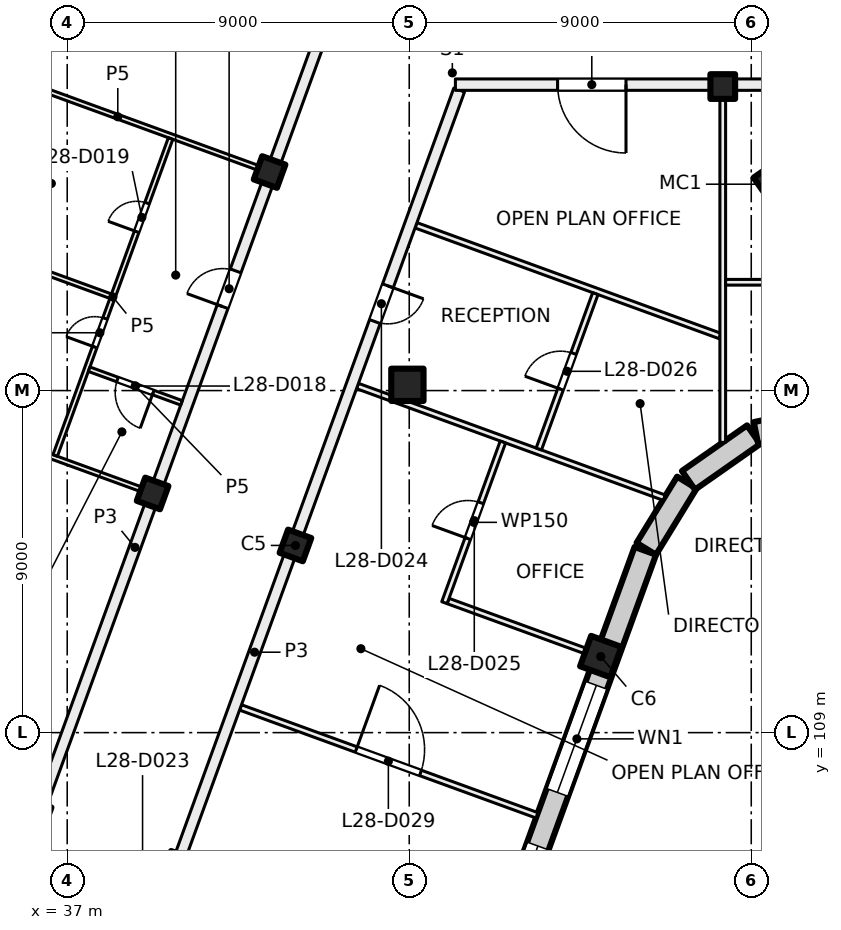
"""IFC4 building model, lengths in metres.
Left out: names, types, materials, properties, quantities, classifications, styles, units other than length and angle.
Written with IfcOpenShell. Run it as: python <this file> out.ifc"""

import sys

from ifc_helpers import new_model, si_unit, direction, frame, frame_2d, origin, origin_2d, place, context, subcontext, project, spatial, rectangle, hollow_rectangle, extrude, element, fill, save


model = new_model("IFC4")
c1 = context("Model", 3, precision=1e-05, world=origin(), true_north=direction((0.0, 1.0)))
c2 = subcontext(c1, "Body", "Model", "MODEL_VIEW")
j1 = project(units=[si_unit("LENGTHUNIT", "METRE"), si_unit("PLANEANGLEUNIT", "RADIAN")], contexts=[c1])
p1 = place(None, origin())
s1 = spatial("IfcSite", under=j1, at=p1, CompositionType="ELEMENT")
p2 = place(p1, origin())
s2 = spatial("IfcBuilding", under=s1, at=p2, CompositionType="ELEMENT")
p3 = place(p2, frame((0.0, 0.0, 121.0)))
s3 = spatial("IfcBuildingStorey", under=s2, at=p3, CompositionType="ELEMENT", Elevation=121.0)
p4 = place(p3, frame((56.036, 123.43, 0.0), z_axis=(0.0, 0.0, 1.0), x_axis=(0.573576436351, -0.819152044289, 0.0)))
e1 = element("IfcColumn", 1, at=p4, inside=s3, PredefinedType="COLUMN", context=c2, shape_type="SweptSolid", body=[
    extrude(hollow_rectangle(XDim=1.4, YDim=1.4, WallThickness=0.04, at=origin_2d()), origin(), (0.0, 0.0, 1.0), 4.0),
])
p5 = place(p3, frame((54.25, 126.0, 0.0), z_axis=(0.0, 0.0, 1.0), x_axis=(1.0, 0.0, 0.0)))
e2 = element("IfcColumn", 2, at=p5, inside=s3, PredefinedType="COLUMN", context=c2, shape_type="SweptSolid", body=[
    extrude(rectangle(XDim=0.65, YDim=0.65, at=origin_2d()), origin(), (0.0, 0.0, 1.0), 4.0),
])
p6 = place(p3, frame((45.952, 118.152, 0.0), z_axis=(0.0, 0.0, 1.0), x_axis=(1.0, 0.0, 0.0)))
e3 = element("IfcColumn", 3, at=p6, inside=s3, PredefinedType="COLUMN", context=c2, shape_type="SweptSolid", body=[
    extrude(rectangle(XDim=0.85, YDim=0.85, at=origin_2d()), origin(), (0.0, 0.0, 1.0), 4.0),
])
for number, where, z_axis, x_axis in (
    (4, (43.006, 113.925, 0.0), (0.0, 0.0, 1.0), (-0.342, -0.94, 0.0)),
    (5, (42.325, 123.751, 0.0), (0.0, 0.0, 1.0), (-0.342, -0.94, 0.0)),
    (6, (39.247, 115.293, 0.0), (0.0, 0.0, 1.0), (-0.342, -0.94, 0.0)),
):
    element("IfcColumn", number, at=place(p3, frame(where, z_axis=z_axis, x_axis=x_axis)), inside=s3, PredefinedType="COLUMN", context=c2, shape_type="SweptSolid", body=[
        extrude(rectangle(XDim=0.65, YDim=0.65, at=origin_2d()), origin(), (0.0, 0.0, 1.0), 4.0),
    ])
p7 = place(p3, frame((51.04, 111.001, 0.0), z_axis=(0.0, 0.0, 1.0), x_axis=(-0.342020143326, -0.939692620786, 0.0)))
e7 = element("IfcColumn", 7, at=p7, inside=s3, PredefinedType="COLUMN", context=c2, shape_type="SweptSolid", body=[
    extrude(rectangle(XDim=0.85, YDim=0.85, at=origin_2d()), origin(), (0.0, 0.0, 1.0), 4.0),
])
p8 = place(p3, frame((52.212, 113.783, 0.0), z_axis=(0.0, 0.0, 1.0), x_axis=(-0.34202521188, -0.939690775968, 0.0)))
e8 = element("IfcWall", 8, at=p8, inside=s3, PredefinedType="SOLIDWALL", context=c2, shape_type="SweptSolid", body=[
    extrude(rectangle(XDim=21.745, YDim=0.6, at=frame_2d((10.873, 0.0))), origin(), (0.0, 0.0, 1.0), 3.625),
])
p9 = place(p8, frame((3.765, 0.0, 0.9)))
e9 = element("IfcOpeningElement", 9, at=p9, cuts=e8, PredefinedType="OPENING", context=c2, shape_type="SweptSolid", body=[
    extrude(rectangle(XDim=3.0, YDim=2.4, at=frame_2d((1.5, 1.2))), frame((0.0, 0.31, 0.0), z_axis=(0.0, -1.0, 0.0), x_axis=(1.0, 0.0, 0.0)), (0.0, 0.0, 1.0), 0.62),
])
p10 = place(p8, frame((8.265, 0.0, 0.9)))
e10 = element("IfcOpeningElement", 10, at=p10, cuts=e8, PredefinedType="OPENING", context=c2, shape_type="SweptSolid", body=[
    extrude(rectangle(XDim=3.0, YDim=2.4, at=frame_2d((1.5, 1.2))), frame((0.0, 0.31, 0.0), z_axis=(0.0, -1.0, 0.0), x_axis=(1.0, 0.0, 0.0)), (0.0, 0.0, 1.0), 0.62),
])
p11 = place(p8, frame((12.765, 0.0, 0.9)))
e11 = element("IfcOpeningElement", 11, at=p11, cuts=e8, PredefinedType="OPENING", context=c2, shape_type="SweptSolid", body=[
    extrude(rectangle(XDim=3.0, YDim=2.4, at=frame_2d((1.5, 1.2))), frame((0.0, 0.31, 0.0), z_axis=(0.0, -1.0, 0.0), x_axis=(1.0, 0.0, 0.0)), (0.0, 0.0, 1.0), 0.62),
])
p12 = place(p8, frame((17.265, 0.0, 0.9)))
e12 = element("IfcOpeningElement", 12, at=p12, cuts=e8, PredefinedType="OPENING", context=c2, shape_type="SweptSolid", body=[
    extrude(rectangle(XDim=3.0, YDim=2.4, at=frame_2d((1.5, 1.2))), frame((0.0, 0.31, 0.0), z_axis=(0.0, -1.0, 0.0), x_axis=(1.0, 0.0, 0.0)), (0.0, 0.0, 1.0), 0.62),
])
p13 = place(p3, frame((53.305, 115.578, 0.0), z_axis=(0.0, 0.0, 1.0), x_axis=(-0.522402266438, -0.852699168535, 0.0)))
e13 = element("IfcWall", 13, at=p13, inside=s3, PredefinedType="SOLIDWALL", context=c2, shape_type="SweptSolid", body=[
    extrude(rectangle(XDim=2.042, YDim=0.6, at=frame_2d((1.021, 0.0))), origin(), (0.0, 0.0, 1.0), 3.625),
])
for number, where, z_axis, x_axis in (
    (14, (55.062, 116.839, 0.0), (0.0, 0.0, 1.0), (-0.819, -0.574, 0.0)),
    (15, (57.175, 117.294, 0.0), (0.0, 0.0, 1.0), (-0.98, -0.199, 0.0)),
):
    element("IfcWall", number, at=place(p3, frame(where, z_axis=z_axis, x_axis=x_axis)), inside=s3, PredefinedType="SOLIDWALL", context=c2, shape_type="SweptSolid", body=[
        extrude(rectangle(XDim=2.092, YDim=0.6, at=frame_2d((1.046, 0.0))), origin(), (0.0, 0.0, 1.0), 3.625),
    ])
p14 = place(p3, frame((31.353, 118.166, 0.0), z_axis=(0.0, 0.0, 1.0), x_axis=(0.939687752599, -0.342033518263, 0.0)))
e16 = element("IfcWall", 16, at=p14, inside=s3, PredefinedType="PARTITIONING", context=c2, shape_type="SweptSolid", body=[
    extrude(rectangle(XDim=8.301, YDim=0.125, at=frame_2d((4.15, 0.0))), origin(), (0.0, 0.0, 1.0), 3.625),
])
p15 = place(p3, frame((32.881, 97.657, 0.0), z_axis=(0.0, 0.0, 1.0), x_axis=(0.342017360004, 0.939693633828, 0.0)))
e17 = element("IfcWall", 17, at=p15, inside=s3, PredefinedType="PARTITIONING", context=c2, shape_type="SweptSolid", body=[
    extrude(rectangle(XDim=34.516, YDim=0.3, at=frame_2d((17.258, 0.0))), origin(), (0.0, 0.0, 1.0), 3.625),
])
p16 = place(p15, frame((7.475, 0.0, 0.0)))
e18 = element("IfcOpeningElement", 18, at=p16, cuts=e17, PredefinedType="OPENING", context=c2, shape_type="SweptSolid", body=[
    extrude(rectangle(XDim=1.8, YDim=2.1, at=frame_2d((0.9, 1.05))), frame((0.0, 0.16, 0.0), z_axis=(0.0, -1.0, 0.0), x_axis=(1.0, 0.0, 0.0)), (0.0, 0.0, 1.0), 0.32),
])
p17 = place(p15, frame((24.0, 0.0, 0.0)))
e19 = element("IfcOpeningElement", 19, at=p17, cuts=e17, PredefinedType="OPENING", context=c2, shape_type="SweptSolid", body=[
    extrude(rectangle(XDim=1.0, YDim=2.1, at=frame_2d((0.5, 1.05))), frame((0.0, 0.16, 0.0), z_axis=(0.0, -1.0, 0.0), x_axis=(1.0, 0.0, 0.0)), (0.0, 0.0, 1.0), 0.32),
])
p18 = place(p3, frame((32.892, 122.395, 0.0), z_axis=(0.0, 0.0, 1.0), x_axis=(0.939696437289, -0.342009657388, 0.0)))
e20 = element("IfcWall", 20, at=p18, inside=s3, PredefinedType="PARTITIONING", context=c2, shape_type="SweptSolid", body=[
    extrude(rectangle(XDim=5.588, YDim=0.125, at=frame_2d((2.794, 0.0))), origin(), (0.0, 0.0, 1.0), 3.625),
])
p19 = place(p3, frame((34.431, 126.624, 0.0), z_axis=(0.0, 0.0, 1.0), x_axis=(0.939687752599, -0.342033518263, 0.0)))
e21 = element("IfcWall", 21, at=p19, inside=s3, PredefinedType="PARTITIONING", context=c2, shape_type="SweptSolid", body=[
    extrude(rectangle(XDim=8.301, YDim=0.125, at=frame_2d((4.15, 0.0))), origin(), (0.0, 0.0, 1.0), 3.625),
])
p20 = place(p3, frame((36.684, 116.293, 0.0), z_axis=(0.0, 0.0, 1.0), x_axis=(0.342089829483, 0.939667254173, 0.0)))
e22 = element("IfcWall", 22, at=p20, inside=s3, PredefinedType="PARTITIONING", context=c2, shape_type="SweptSolid", body=[
    extrude(rectangle(XDim=8.875, YDim=0.125, at=frame_2d((4.437, 0.0))), origin(), (0.0, 0.0, 1.0), 3.625),
])
p21 = place(p20, frame((6.266, 0.0, 0.0)))
e23 = element("IfcOpeningElement", 23, at=p21, cuts=e22, PredefinedType="OPENING", context=c2, shape_type="SweptSolid", body=[
    extrude(rectangle(XDim=0.8, YDim=2.1, at=frame_2d((0.4, 1.05))), frame((0.0, 0.073, 0.0), z_axis=(0.0, -1.0, 0.0), x_axis=(1.0, 0.0, 0.0)), (0.0, 0.0, 1.0), 0.145),
])
p22 = place(p20, frame((3.036, 0.0, 0.0)))
e24 = element("IfcOpeningElement", 24, at=p22, cuts=e22, PredefinedType="OPENING", context=c2, shape_type="SweptSolid", body=[
    extrude(rectangle(XDim=0.8, YDim=2.1, at=frame_2d((0.4, 1.05))), frame((0.0, 0.073, 0.0), z_axis=(0.0, -1.0, 0.0), x_axis=(1.0, 0.0, 0.0)), (0.0, 0.0, 1.0), 0.145),
])
p23 = place(p3, frame((40.008, 117.677, 0.0), z_axis=(0.0, 0.0, 1.0), x_axis=(-0.939674895655, 0.342068838798, 0.0)))
e25 = element("IfcWall", 25, at=p23, inside=s3, PredefinedType="PARTITIONING", context=c2, shape_type="SweptSolid", body=[
    extrude(rectangle(XDim=2.587, YDim=0.125, at=frame_2d((1.293, 0.0))), origin(), (0.0, 0.0, 1.0), 3.625),
])
p24 = place(p23, frame((0.793, 0.0, 0.0)))
e26 = element("IfcOpeningElement", 26, at=p24, cuts=e25, PredefinedType="OPENING", context=c2, shape_type="SweptSolid", body=[
    extrude(rectangle(XDim=1.0, YDim=2.1, at=frame_2d((0.5, 1.05))), frame((0.0, 0.073, 0.0), z_axis=(0.0, -1.0, 0.0), x_axis=(1.0, 0.0, 0.0)), (0.0, 0.0, 1.0), 0.145),
])
p25 = place(p3, frame((41.561, 109.663, 0.0), z_axis=(0.0, 0.0, 1.0), x_axis=(0.939673986983, -0.342071334939, 0.0)))
e27 = element("IfcWall", 27, at=p25, inside=s3, PredefinedType="PARTITIONING", context=c2, shape_type="SweptSolid", body=[
    extrude(rectangle(XDim=8.3, YDim=0.15, at=frame_2d((4.15, 0.0))), origin(), (0.0, 0.0, 1.0), 3.625),
])
p26 = place(p25, frame((3.24, 0.0, 0.0)))
e28 = element("IfcOpeningElement", 28, at=p26, cuts=e27, PredefinedType="OPENING", context=c2, shape_type="SweptSolid", body=[
    extrude(rectangle(XDim=1.8, YDim=2.1, at=frame_2d((0.9, 1.05))), frame((0.0, 0.085, 0.0), z_axis=(0.0, -1.0, 0.0), x_axis=(1.0, 0.0, 0.0)), (0.0, 0.0, 1.0), 0.17),
])
p27 = place(p3, frame((44.639, 118.12, 0.0), z_axis=(0.0, 0.0, 1.0), x_axis=(0.939669707102, -0.342083091593, 0.0)))
e29 = element("IfcWall", 29, at=p27, inside=s3, PredefinedType="PARTITIONING", context=c2, shape_type="SweptSolid", body=[
    extrude(rectangle(XDim=8.589, YDim=0.15, at=frame_2d((4.295, 0.0))), origin(), (0.0, 0.0, 1.0), 3.625),
])
p28 = place(p3, frame((46.178, 122.349, 0.0), z_axis=(0.0, 0.0, 1.0), x_axis=(0.939669476286, -0.342083725624, 0.0)))
e30 = element("IfcWall", 30, at=p28, inside=s3, PredefinedType="PARTITIONING", context=c2, shape_type="SweptSolid", body=[
    extrude(rectangle(XDim=8.516, YDim=0.15, at=frame_2d((4.258, 0.0))), origin(), (0.0, 0.0, 1.0), 3.625),
])
p29 = place(p3, frame((50.899, 111.052, 0.0), z_axis=(0.0, 0.0, 1.0), x_axis=(-0.93970873465, 0.341975867603, 0.0)))
e31 = element("IfcWall", 31, at=p29, inside=s3, PredefinedType="PARTITIONING", context=c2, shape_type="SweptSolid", body=[
    extrude(rectangle(XDim=4.126, YDim=0.15, at=frame_2d((2.063, 0.0))), origin(), (0.0, 0.0, 1.0), 3.625),
])
p30 = place(p3, frame((47.314, 125.909, 0.0), z_axis=(0.0, 0.0, 1.0), x_axis=(-0.342010770371, -0.939696032209, 0.0)))
e32 = element("IfcWall", 32, at=p30, inside=s3, PredefinedType="PARTITIONING", context=c2, shape_type="SweptSolid", body=[
    extrude(rectangle(XDim=31.485, YDim=0.3, at=frame_2d((15.742, 0.0))), origin(), (0.0, 0.0, 1.0), 3.625),
])
p31 = place(p30, frame((23.459, 0.0, 0.0)))
e33 = element("IfcOpeningElement", 33, at=p31, cuts=e32, PredefinedType="OPENING", context=c2, shape_type="SweptSolid", body=[
    extrude(rectangle(XDim=1.8, YDim=2.1, at=frame_2d((0.9, 1.05))), frame((0.0, 0.16, 0.0), z_axis=(0.0, -1.0, 0.0), x_axis=(1.0, 0.0, 0.0)), (0.0, 0.0, 1.0), 0.32),
])
p32 = place(p30, frame((5.484, 0.0, 0.0)))
e34 = element("IfcOpeningElement", 34, at=p32, cuts=e32, PredefinedType="OPENING", context=c2, shape_type="SweptSolid", body=[
    extrude(rectangle(XDim=1.0, YDim=2.1, at=frame_2d((0.5, 1.05))), frame((0.0, 0.16, 0.0), z_axis=(0.0, -1.0, 0.0), x_axis=(1.0, 0.0, 0.0)), (0.0, 0.0, 1.0), 0.32),
])
p33 = place(p3, frame((46.926, 112.419, 0.0), z_axis=(0.0, 0.0, 1.0), x_axis=(0.342056723843, 0.93967930576, 0.0)))
e35 = element("IfcWall", 35, at=p33, inside=s3, PredefinedType="PARTITIONING", context=c2, shape_type="SweptSolid", body=[
    extrude(rectangle(XDim=4.5, YDim=0.15, at=frame_2d((2.25, 0.0))), origin(), (0.0, 0.0, 1.0), 3.625),
])
p34 = place(p33, frame((1.797, 0.0, 0.0)))
e36 = element("IfcOpeningElement", 36, at=p34, cuts=e35, PredefinedType="OPENING", context=c2, shape_type="SweptSolid", body=[
    extrude(rectangle(XDim=1.0, YDim=2.1, at=frame_2d((0.5, 1.05))), frame((0.0, 0.085, 0.0), z_axis=(0.0, -1.0, 0.0), x_axis=(1.0, 0.0, 0.0)), (0.0, 0.0, 1.0), 0.17),
])
p35 = place(p3, frame((49.41, 116.463, 0.0), z_axis=(0.0, 0.0, 1.0), x_axis=(0.341837690029, 0.939759008297, 0.0)))
e37 = element("IfcWall", 37, at=p35, inside=s3, PredefinedType="PARTITIONING", context=c2, shape_type="SweptSolid", body=[
    extrude(rectangle(XDim=4.35, YDim=0.15, at=frame_2d((2.175, 0.0))), origin(), (0.0, 0.0, 1.0), 3.625),
])
p36 = place(p35, frame((1.675, 0.0, 0.0)))
e38 = element("IfcOpeningElement", 38, at=p36, cuts=e37, PredefinedType="OPENING", context=c2, shape_type="SweptSolid", body=[
    extrude(rectangle(XDim=1.0, YDim=2.1, at=frame_2d((0.5, 1.05))), frame((0.0, 0.085, 0.0), z_axis=(0.0, -1.0, 0.0), x_axis=(1.0, 0.0, 0.0)), (0.0, 0.0, 1.0), 0.17),
])
p37 = place(p3, frame((54.25, 116.637, 0.0), z_axis=(0.0, 0.0, 1.0), x_axis=(0.0, 1.0, 0.0)))
e39 = element("IfcWall", 39, at=p37, inside=s3, PredefinedType="PARTITIONING", context=c2, shape_type="SweptSolid", body=[
    extrude(rectangle(XDim=9.263, YDim=0.15, at=frame_2d((4.631, 0.0))), origin(), (0.0, 0.0, 1.0), 3.625),
])
p38 = place(p3, frame((54.325, 120.85, 0.0), z_axis=(0.0, 0.0, 1.0), x_axis=(1.0, 0.0, 0.0)))
e40 = element("IfcWall", 40, at=p38, inside=s3, PredefinedType="PARTITIONING", context=c2, shape_type="SweptSolid", body=[
    extrude(rectangle(XDim=4.35, YDim=0.15, at=frame_2d((2.175, 0.0))), origin(), (0.0, 0.0, 1.0), 3.625),
])
p39 = place(p38, frame((1.675, 0.0, 0.0)))
e41 = element("IfcOpeningElement", 41, at=p39, cuts=e40, PredefinedType="OPENING", context=c2, shape_type="SweptSolid", body=[
    extrude(rectangle(XDim=1.0, YDim=2.1, at=frame_2d((0.5, 1.05))), frame((0.0, 0.085, 0.0), z_axis=(0.0, -1.0, 0.0), x_axis=(1.0, 0.0, 0.0)), (0.0, 0.0, 1.0), 0.17),
])
p40 = place(p3, frame((91.0, 126.05, 0.0), z_axis=(0.0, 0.0, 1.0), x_axis=(-1.0, 0.0, 0.0)))
e42 = element("IfcWall", 42, at=p40, inside=s3, PredefinedType="PARTITIONING", context=c2, shape_type="SweptSolid", body=[
    extrude(rectangle(XDim=43.785, YDim=0.3, at=frame_2d((21.893, 0.0))), origin(), (0.0, 0.0, 1.0), 3.625),
])
p41 = place(p40, frame((7.475, 0.0, 0.0)))
e43 = element("IfcOpeningElement", 43, at=p41, cuts=e42, PredefinedType="OPENING", context=c2, shape_type="SweptSolid", body=[
    extrude(rectangle(XDim=1.8, YDim=2.1, at=frame_2d((0.9, 1.05))), frame((0.0, 0.16, 0.0), z_axis=(0.0, -1.0, 0.0), x_axis=(1.0, 0.0, 0.0)), (0.0, 0.0, 1.0), 0.32),
])
p42 = place(p40, frame((34.0, 0.0, 0.0)))
e44 = element("IfcOpeningElement", 44, at=p42, cuts=e42, PredefinedType="OPENING", context=c2, shape_type="SweptSolid", body=[
    extrude(rectangle(XDim=1.0, YDim=2.1, at=frame_2d((0.5, 1.05))), frame((0.0, 0.16, 0.0), z_axis=(0.0, -1.0, 0.0), x_axis=(1.0, 0.0, 0.0)), (0.0, 0.0, 1.0), 0.32),
])
p43 = place(p40, frame((39.296, 0.0, 0.0)))
e45 = element("IfcOpeningElement", 45, at=p43, cuts=e42, PredefinedType="OPENING", context=c2, shape_type="SweptSolid", body=[
    extrude(rectangle(XDim=1.8, YDim=2.1, at=frame_2d((0.9, 1.05))), frame((0.0, 0.16, 0.0), z_axis=(0.0, -1.0, 0.0), x_axis=(1.0, 0.0, 0.0)), (0.0, 0.0, 1.0), 0.32),
])
p44 = place(p9, origin())
e46 = element("IfcWindow", 46, at=p44, inside=s3, PartitioningType="SINGLE_PANEL", PredefinedType="WINDOW", context=c2, shape_type="SweptSolid", body=[
    extrude(rectangle(XDim=3.0, YDim=2.4, at=frame_2d((1.5, 1.2))), frame((0.0, 0.03, 0.0), z_axis=(0.0, -1.0, 0.0), x_axis=(1.0, 0.0, 0.0)), (0.0, 0.0, 1.0), 0.06),
])
fill(e9, e46)
p45 = place(p10, origin())
e47 = element("IfcWindow", 47, at=p45, inside=s3, PartitioningType="SINGLE_PANEL", PredefinedType="WINDOW", context=c2, shape_type="SweptSolid", body=[
    extrude(rectangle(XDim=3.0, YDim=2.4, at=frame_2d((1.5, 1.2))), frame((0.0, 0.03, 0.0), z_axis=(0.0, -1.0, 0.0), x_axis=(1.0, 0.0, 0.0)), (0.0, 0.0, 1.0), 0.06),
])
fill(e10, e47)
p46 = place(p17, origin())
e48 = element("IfcDoor", 48, at=p46, inside=s3, OperationType="SINGLE_SWING_LEFT", PredefinedType="DOOR", context=c2, shape_type="SweptSolid", body=[
    extrude(rectangle(XDim=1.0, YDim=2.1, at=frame_2d((0.5, 1.05))), frame((0.0, 0.025, 0.0), z_axis=(0.0, -1.0, 0.0), x_axis=(1.0, 0.0, 0.0)), (0.0, 0.0, 1.0), 0.05),
])
fill(e19, e48)
p47 = place(p24, origin())
e49 = element("IfcDoor", 49, at=p47, inside=s3, OperationType="SINGLE_SWING_LEFT", PredefinedType="DOOR", context=c2, shape_type="SweptSolid", body=[
    extrude(rectangle(XDim=1.0, YDim=2.1, at=frame_2d((0.5, 1.05))), frame((0.0, 0.025, 0.0), z_axis=(0.0, -1.0, 0.0), x_axis=(1.0, 0.0, 0.0)), (0.0, 0.0, 1.0), 0.05),
])
fill(e26, e49)
p48 = place(p21, origin())
e50 = element("IfcDoor", 50, at=p48, inside=s3, OperationType="SINGLE_SWING_RIGHT", PredefinedType="DOOR", context=c2, shape_type="SweptSolid", body=[
    extrude(rectangle(XDim=0.8, YDim=2.1, at=frame_2d((0.4, 1.05))), frame((0.0, 0.025, 0.0), z_axis=(0.0, -1.0, 0.0), x_axis=(1.0, 0.0, 0.0)), (0.0, 0.0, 1.0), 0.05),
])
fill(e23, e50)
p49 = place(p22, origin())
e51 = element("IfcDoor", 51, at=p49, inside=s3, OperationType="SINGLE_SWING_LEFT", PredefinedType="DOOR", context=c2, shape_type="SweptSolid", body=[
    extrude(rectangle(XDim=0.8, YDim=2.1, at=frame_2d((0.4, 1.05))), frame((0.0, 0.025, 0.0), z_axis=(0.0, -1.0, 0.0), x_axis=(1.0, 0.0, 0.0)), (0.0, 0.0, 1.0), 0.05),
])
fill(e24, e51)
p50 = place(p32, origin())
e52 = element("IfcDoor", 52, at=p50, inside=s3, OperationType="SINGLE_SWING_LEFT", PredefinedType="DOOR", context=c2, shape_type="SweptSolid", body=[
    extrude(rectangle(XDim=1.0, YDim=2.1, at=frame_2d((0.5, 1.05))), frame((0.0, 0.025, 0.0), z_axis=(0.0, -1.0, 0.0), x_axis=(1.0, 0.0, 0.0)), (0.0, 0.0, 1.0), 0.05),
])
fill(e34, e52)
p51 = place(p34, origin())
e53 = element("IfcDoor", 53, at=p51, inside=s3, OperationType="SINGLE_SWING_RIGHT", PredefinedType="DOOR", context=c2, shape_type="SweptSolid", body=[
    extrude(rectangle(XDim=1.0, YDim=2.1, at=frame_2d((0.5, 1.05))), frame((0.0, 0.025, 0.0), z_axis=(0.0, -1.0, 0.0), x_axis=(1.0, 0.0, 0.0)), (0.0, 0.0, 1.0), 0.05),
])
fill(e36, e53)
p52 = place(p36, origin())
e54 = element("IfcDoor", 54, at=p52, inside=s3, OperationType="SINGLE_SWING_LEFT", PredefinedType="DOOR", context=c2, shape_type="SweptSolid", body=[
    extrude(rectangle(XDim=1.0, YDim=2.1, at=frame_2d((0.5, 1.05))), frame((0.0, 0.025, 0.0), z_axis=(0.0, -1.0, 0.0), x_axis=(1.0, 0.0, 0.0)), (0.0, 0.0, 1.0), 0.05),
])
fill(e38, e54)
p53 = place(p43, origin())
e55 = element("IfcDoor", 55, at=p53, inside=s3, OperationType="DOUBLE_DOOR_SINGLE_SWING", PredefinedType="DOOR", context=c2, shape_type="SweptSolid", body=[
    extrude(rectangle(XDim=1.8, YDim=2.1, at=frame_2d((0.9, 1.05))), frame((0.0, 0.025, 0.0), z_axis=(0.0, -1.0, 0.0), x_axis=(1.0, 0.0, 0.0)), (0.0, 0.0, 1.0), 0.05),
])
fill(e45, e55)
p54 = place(p26, origin())
e56 = element("IfcDoor", 56, at=p54, inside=s3, OperationType="DOUBLE_DOOR_SINGLE_SWING", PredefinedType="DOOR", context=c2, shape_type="SweptSolid", body=[
    extrude(rectangle(XDim=1.8, YDim=2.1, at=frame_2d((0.9, 1.05))), frame((0.0, 0.025, 0.0), z_axis=(0.0, -1.0, 0.0), x_axis=(1.0, 0.0, 0.0)), (0.0, 0.0, 1.0), 0.05),
])
fill(e28, e56)
save(model, sys.argv[1])
